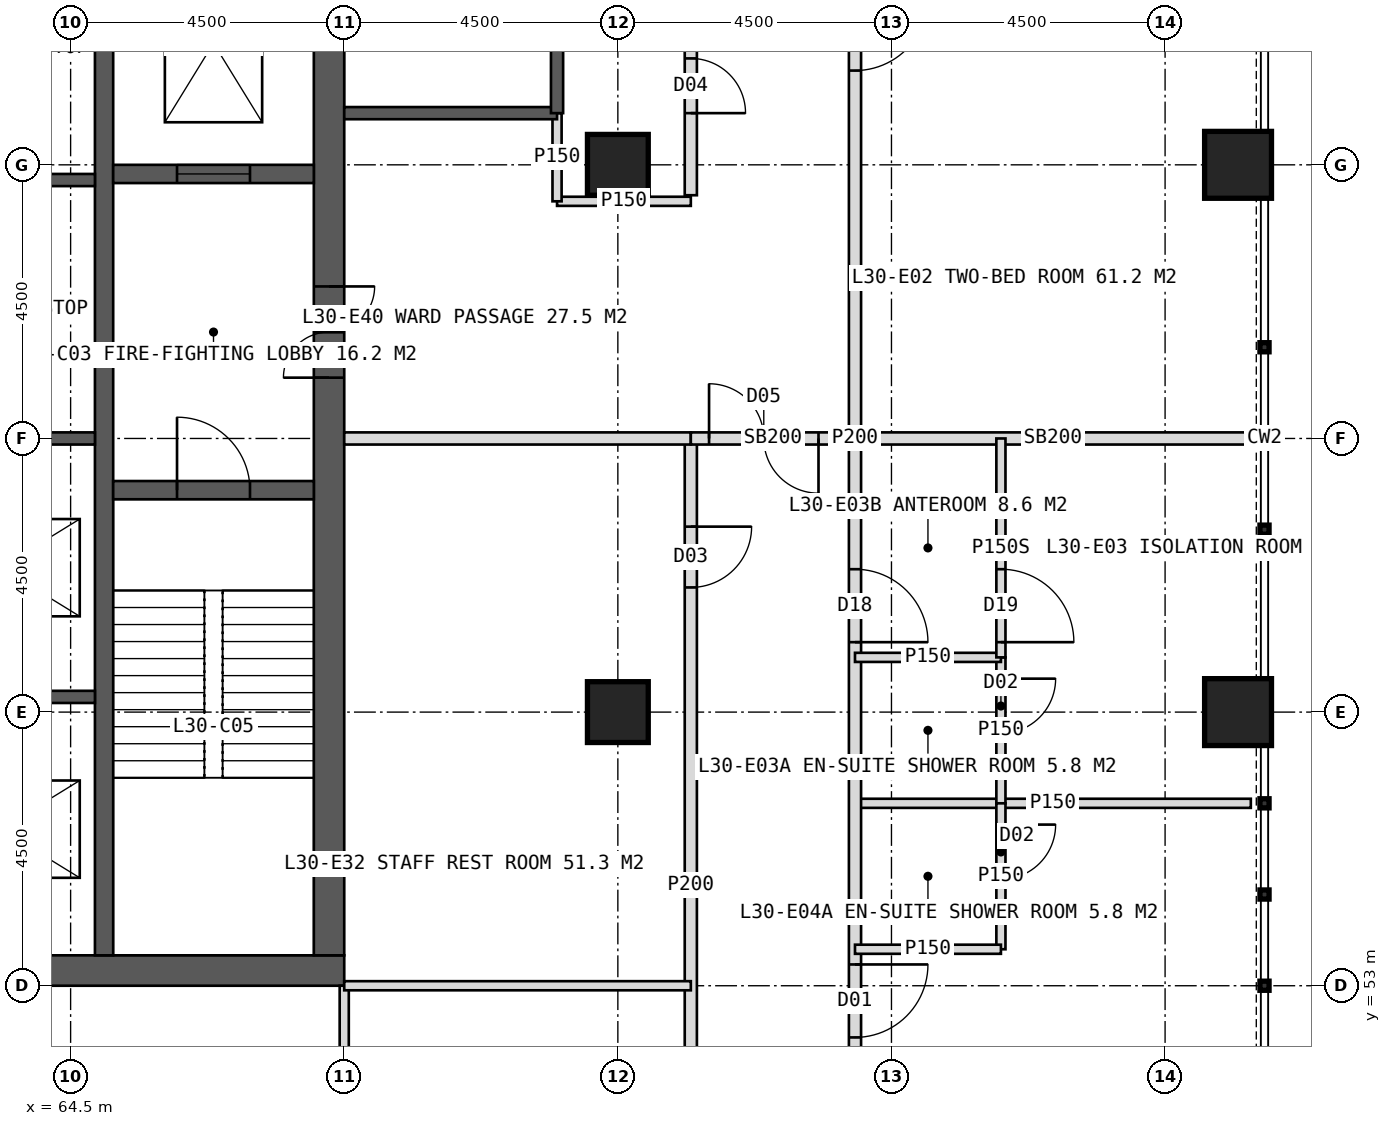
"""IFC4 building model, lengths in metres.
Left out: names, types, materials, properties, quantities, classifications, styles, units other than length and angle.
Written with IfcOpenShell. Run it as: python <this file> out.ifc"""

import sys

from ifc_helpers import new_model, si_unit, direction, frame, frame_2d, origin, origin_2d, place, context, subcontext, project, spatial, rectangle, hollow_rectangle, extrude, element, fill, save


model = new_model("IFC4")
c1 = context("Model", 3, precision=1e-05, world=origin(), true_north=direction((0.0, 1.0)))
c2 = subcontext(c1, "Body", "Model", "MODEL_VIEW")
j1 = project(units=[si_unit("LENGTHUNIT", "METRE"), si_unit("PLANEANGLEUNIT", "RADIAN")], contexts=[c1])
p1 = place(None, origin())
s1 = spatial("IfcSite", under=j1, at=p1, CompositionType="ELEMENT")
p2 = place(p1, origin())
s2 = spatial("IfcBuilding", under=s1, at=p2, CompositionType="ELEMENT")
p3 = place(p2, frame((0.0, 0.0, 128.0)))
s3 = spatial("IfcBuildingStorey", under=s2, at=p3, CompositionType="ELEMENT", Elevation=128.0)
p4 = place(p3, frame((51.0, 53.25, 0.0), z_axis=(0.0, 0.0, 1.0), x_axis=(1.0, 0.0, 0.0)))
e1 = element("IfcWall", 1, at=p4, inside=s3, PredefinedType="SHEAR", context=c2, shape_type="SweptSolid", body=[
    extrude(rectangle(XDim=18.0, YDim=0.5, at=frame_2d((9.0, 0.0))), origin(), (0.0, 0.0, 1.0), 4.0),
])
p5 = place(p4, frame((8.1, 0.0, 0.0)))
e2 = element("IfcOpeningElement", 2, at=p5, cuts=e1, PredefinedType="OPENING", context=c2, shape_type="SweptSolid", body=[
    extrude(rectangle(XDim=1.8, YDim=2.2, at=frame_2d((0.9, 1.1))), frame((0.0, 0.26, 0.0), z_axis=(0.0, -1.0, 0.0), x_axis=(1.0, 0.0, 0.0)), (0.0, 0.0, 1.0), 0.52),
])
p6 = place(p3, frame((68.75, 53.5, 0.0), z_axis=(0.0, 0.0, 1.0), x_axis=(0.0, 1.0, 0.0)))
e3 = element("IfcWall", 3, at=p6, inside=s3, PredefinedType="SHEAR", context=c2, shape_type="SweptSolid", body=[
    extrude(rectangle(XDim=17.0, YDim=0.5, at=frame_2d((8.5, 0.0))), origin(), (0.0, 0.0, 1.0), 4.0),
])
p7 = place(p6, frame((9.5, 0.0, 0.0)))
e4 = element("IfcOpeningElement", 4, at=p7, cuts=e3, PredefinedType="OPENING", context=c2, shape_type="SweptSolid", body=[
    extrude(rectangle(XDim=1.5, YDim=2.2, at=frame_2d((0.75, 1.1))), frame((0.0, 0.26, 0.0), z_axis=(0.0, -1.0, 0.0), x_axis=(1.0, 0.0, 0.0)), (0.0, 0.0, 1.0), 0.52),
])
p8 = place(p3, frame((65.05, 53.5, 0.0), z_axis=(0.0, 0.0, 1.0), x_axis=(0.0, 1.0, 0.0)))
e5 = element("IfcWall", 5, at=p8, inside=s3, PredefinedType="SHEAR", context=c2, shape_type="SweptSolid", body=[
    extrude(rectangle(XDim=17.0, YDim=0.3, at=frame_2d((8.5, 0.0))), origin(), (0.0, 0.0, 1.0), 4.0),
])
for number, where, z_axis, x_axis in (
    (6, (61.85, 57.75, 0.0), (0.0, 0.0, 1.0), (1.0, 0.0, 0.0)),
    (7, (61.85, 62.0, 0.0), (0.0, 0.0, 1.0), (1.0, 0.0, 0.0)),
    (8, (61.85, 66.25, 0.0), (0.0, 0.0, 1.0), (1.0, 0.0, 0.0)),
):
    element("IfcWall", number, at=place(p3, frame(where, z_axis=z_axis, x_axis=x_axis)), inside=s3, PredefinedType="SHEAR", context=c2, shape_type="SweptSolid", body=[
        extrude(rectangle(XDim=3.05, YDim=0.2, at=frame_2d((1.525, 0.0))), origin(), (0.0, 0.0, 1.0), 4.0),
    ])
p9 = place(p3, frame((65.2, 61.15, 0.0), z_axis=(0.0, 0.0, 1.0), x_axis=(1.0, 0.0, 0.0)))
e9 = element("IfcWall", 9, at=p9, inside=s3, PredefinedType="SHEAR", context=c2, shape_type="SweptSolid", body=[
    extrude(rectangle(XDim=3.3, YDim=0.3, at=frame_2d((1.65, 0.0))), origin(), (0.0, 0.0, 1.0), 4.0),
])
p10 = place(p9, frame((1.05, 0.0, 0.0)))
e10 = element("IfcOpeningElement", 10, at=p10, cuts=e9, PredefinedType="OPENING", context=c2, shape_type="SweptSolid", body=[
    extrude(rectangle(XDim=1.2, YDim=2.1, at=frame_2d((0.6, 1.05))), frame((0.0, 0.16, 0.0), z_axis=(0.0, -1.0, 0.0), x_axis=(1.0, 0.0, 0.0)), (0.0, 0.0, 1.0), 0.32),
])
p11 = place(p3, frame((65.2, 66.35, 0.0), z_axis=(0.0, 0.0, 1.0), x_axis=(1.0, 0.0, 0.0)))
e11 = element("IfcWall", 11, at=p11, inside=s3, PredefinedType="SHEAR", context=c2, shape_type="SweptSolid", body=[
    extrude(rectangle(XDim=3.3, YDim=0.3, at=frame_2d((1.65, 0.0))), origin(), (0.0, 0.0, 1.0), 4.0),
])
p12 = place(p11, frame((1.05, 0.0, 0.0)))
e12 = element("IfcOpeningElement", 12, at=p12, cuts=e11, PredefinedType="OPENING", context=c2, shape_type="SweptSolid", body=[
    extrude(rectangle(XDim=1.2, YDim=2.2, at=frame_2d((0.6, 1.1))), frame((0.0, 0.16, 0.0), z_axis=(0.0, -1.0, 0.0), x_axis=(1.0, 0.0, 0.0)), (0.0, 0.0, 1.0), 0.32),
])
for number, where, z_axis, x_axis in (
    (13, (73.5, 57.5, 0.0), (0.0, 0.0, 1.0), (1.0, 0.0, 0.0)),
    (14, (73.5, 66.5, 0.0), (0.0, 0.0, 1.0), (1.0, 0.0, 0.0)),
):
    element("IfcColumn", number, at=place(p3, frame(where, z_axis=z_axis, x_axis=x_axis)), inside=s3, PredefinedType="COLUMN", context=c2, shape_type="SweptSolid", body=[
        extrude(hollow_rectangle(XDim=1.0, YDim=1.0, WallThickness=0.1, at=origin_2d()), origin(), (0.0, 0.0, 1.0), 4.0),
    ])
for number, where, z_axis, x_axis in (
    (15, (83.7, 57.5, 0.0), (0.0, 0.0, 1.0), (1.0, 0.0, 0.0)),
    (16, (83.7, 66.5, 0.0), (0.0, 0.0, 1.0), (1.0, 0.0, 0.0)),
):
    element("IfcColumn", number, at=place(p3, frame(where, z_axis=z_axis, x_axis=x_axis)), inside=s3, PredefinedType="COLUMN", context=c2, shape_type="SweptSolid", body=[
        extrude(hollow_rectangle(XDim=1.1, YDim=1.1, WallThickness=0.1, at=origin_2d()), origin(), (0.0, 0.0, 1.0), 4.0),
    ])
p13 = place(p3, frame((69.0, 53.0, 0.0), z_axis=(0.0, 0.0, 1.0), x_axis=(0.0, -1.0, 0.0)))
e17 = element("IfcWall", 17, at=p13, inside=s3, PredefinedType="PARTITIONING", context=c2, shape_type="SweptSolid", body=[
    extrude(rectangle(XDim=5.7, YDim=0.15, at=frame_2d((2.85, 0.0))), origin(), (0.0, 0.0, 1.0), 3.75),
])
p14 = place(p3, frame((77.4, 62.0, 0.0), z_axis=(0.0, 0.0, 1.0), x_axis=(1.0, 0.0, 0.0)))
e18 = element("IfcWall", 18, at=p14, inside=s3, PredefinedType="SOLIDWALL", context=c2, shape_type="SweptSolid", body=[
    extrude(rectangle(XDim=6.51, YDim=0.2, at=frame_2d((3.255, 0.0))), origin(), (0.0, 0.0, 1.0), 2.95),
])
p15 = place(p3, frame((77.4, 56.0, 0.0), z_axis=(0.0, 0.0, 1.0), x_axis=(1.0, 0.0, 0.0)))
e19 = element("IfcWall", 19, at=p15, inside=s3, PredefinedType="PARTITIONING", context=c2, shape_type="SweptSolid", body=[
    extrude(rectangle(XDim=6.51, YDim=0.15, at=frame_2d((3.255, 0.0))), origin(), (0.0, 0.0, 1.0), 3.75),
])
p16 = place(p3, frame((77.4, 79.4, 0.0), z_axis=(0.0, 0.0, 1.0), x_axis=(0.0, -1.0, 0.0)))
e20 = element("IfcWall", 20, at=p16, inside=s3, PredefinedType="PARTITIONING", context=c2, shape_type="SweptSolid", body=[
    extrude(rectangle(XDim=34.8, YDim=0.2, at=frame_2d((17.4, 0.0))), origin(), (0.0, 0.0, 1.0), 3.75),
])
p17 = place(p16, frame((2.45, 0.0, 0.0)))
e21 = element("IfcOpeningElement", 21, at=p17, cuts=e20, PredefinedType="OPENING", context=c2, shape_type="SweptSolid", body=[
    extrude(rectangle(XDim=1.2, YDim=2.2, at=frame_2d((0.6, 1.1))), frame((0.0, 0.11, 0.0), z_axis=(0.0, -1.0, 0.0), x_axis=(1.0, 0.0, 0.0)), (0.0, 0.0, 1.0), 0.22),
])
p18 = place(p16, frame((10.15, 0.0, 0.0)))
e22 = element("IfcOpeningElement", 22, at=p18, cuts=e20, PredefinedType="OPENING", context=c2, shape_type="SweptSolid", body=[
    extrude(rectangle(XDim=1.2, YDim=2.2, at=frame_2d((0.6, 1.1))), frame((0.0, 0.11, 0.0), z_axis=(0.0, -1.0, 0.0), x_axis=(1.0, 0.0, 0.0)), (0.0, 0.0, 1.0), 0.22),
])
p19 = place(p16, frame((19.55, 0.0, 0.0)))
e23 = element("IfcOpeningElement", 23, at=p19, cuts=e20, PredefinedType="OPENING", context=c2, shape_type="SweptSolid", body=[
    extrude(rectangle(XDim=1.2, YDim=2.2, at=frame_2d((0.6, 1.1))), frame((0.0, 0.11, 0.0), z_axis=(0.0, -1.0, 0.0), x_axis=(1.0, 0.0, 0.0)), (0.0, 0.0, 1.0), 0.22),
])
p20 = place(p16, frame((26.05, 0.0, 0.0)))
e24 = element("IfcOpeningElement", 24, at=p20, cuts=e20, PredefinedType="OPENING", context=c2, shape_type="SweptSolid", body=[
    extrude(rectangle(XDim=1.2, YDim=2.2, at=frame_2d((0.6, 1.1))), frame((0.0, 0.11, 0.0), z_axis=(0.0, -1.0, 0.0), x_axis=(1.0, 0.0, 0.0)), (0.0, 0.0, 1.0), 0.22),
])
p21 = place(p3, frame((79.8, 58.4, 0.0), z_axis=(0.0, 0.0, 1.0), x_axis=(0.0, -1.0, 0.0)))
e25 = element("IfcWall", 25, at=p21, inside=s3, PredefinedType="PARTITIONING", context=c2, shape_type="SweptSolid", body=[
    extrude(rectangle(XDim=2.4, YDim=0.15, at=frame_2d((1.2, 0.0))), origin(), (0.0, 0.0, 1.0), 3.75),
])
p22 = place(p21, frame((0.35, 0.0, 0.0)))
e26 = element("IfcOpeningElement", 26, at=p22, cuts=e25, PredefinedType="OPENING", context=c2, shape_type="SweptSolid", body=[
    extrude(rectangle(XDim=0.9, YDim=2.1, at=frame_2d((0.45, 1.05))), frame((0.0, 0.085, 0.0), z_axis=(0.0, -1.0, 0.0), x_axis=(1.0, 0.0, 0.0)), (0.0, 0.0, 1.0), 0.17),
])
p23 = place(p3, frame((77.4, 58.4, 0.0), z_axis=(0.0, 0.0, 1.0), x_axis=(1.0, 0.0, 0.0)))
e27 = element("IfcWall", 27, at=p23, inside=s3, PredefinedType="PARTITIONING", context=c2, shape_type="SweptSolid", body=[
    extrude(rectangle(XDim=2.4, YDim=0.15, at=frame_2d((1.2, 0.0))), origin(), (0.0, 0.0, 1.0), 3.75),
])
p24 = place(p3, frame((79.8, 62.0, 0.0), z_axis=(0.0, 0.0, 1.0), x_axis=(0.0, -1.0, 0.0)))
e28 = element("IfcWall", 28, at=p24, inside=s3, PredefinedType="PARTITIONING", context=c2, shape_type="SweptSolid", body=[
    extrude(rectangle(XDim=3.6, YDim=0.15, at=frame_2d((1.8, 0.0))), origin(), (0.0, 0.0, 1.0), 3.75),
])
p25 = place(p24, frame((2.15, 0.0, 0.0)))
e29 = element("IfcOpeningElement", 29, at=p25, cuts=e28, PredefinedType="OPENING", context=c2, shape_type="SweptSolid", body=[
    extrude(rectangle(XDim=1.2, YDim=2.2, at=frame_2d((0.6, 1.1))), frame((0.0, 0.085, 0.0), z_axis=(0.0, -1.0, 0.0), x_axis=(1.0, 0.0, 0.0)), (0.0, 0.0, 1.0), 0.17),
])
p26 = place(p3, frame((79.8, 56.0, 0.0), z_axis=(0.0, 0.0, 1.0), x_axis=(0.0, -1.0, 0.0)))
e30 = element("IfcWall", 30, at=p26, inside=s3, PredefinedType="PARTITIONING", context=c2, shape_type="SweptSolid", body=[
    extrude(rectangle(XDim=2.4, YDim=0.15, at=frame_2d((1.2, 0.0))), origin(), (0.0, 0.0, 1.0), 3.75),
])
p27 = place(p26, frame((0.35, 0.0, 0.0)))
e31 = element("IfcOpeningElement", 31, at=p27, cuts=e30, PredefinedType="OPENING", context=c2, shape_type="SweptSolid", body=[
    extrude(rectangle(XDim=0.9, YDim=2.1, at=frame_2d((0.45, 1.05))), frame((0.0, 0.085, 0.0), z_axis=(0.0, -1.0, 0.0), x_axis=(1.0, 0.0, 0.0)), (0.0, 0.0, 1.0), 0.17),
])
p28 = place(p3, frame((77.4, 53.6, 0.0), z_axis=(0.0, 0.0, 1.0), x_axis=(1.0, 0.0, 0.0)))
e32 = element("IfcWall", 32, at=p28, inside=s3, PredefinedType="PARTITIONING", context=c2, shape_type="SweptSolid", body=[
    extrude(rectangle(XDim=2.4, YDim=0.15, at=frame_2d((1.2, 0.0))), origin(), (0.0, 0.0, 1.0), 3.75),
])
p29 = place(p3, frame((74.7, 76.7, 0.0), z_axis=(0.0, 0.0, 1.0), x_axis=(0.0, -1.0, 0.0)))
e33 = element("IfcWall", 33, at=p29, inside=s3, PredefinedType="PARTITIONING", context=c2, shape_type="SweptSolid", body=[
    extrude(rectangle(XDim=10.7, YDim=0.2, at=frame_2d((5.35, 0.0))), origin(), (0.0, 0.0, 1.0), 3.75),
])
p30 = place(p29, frame((1.6, 0.0, 0.0)))
e34 = element("IfcOpeningElement", 34, at=p30, cuts=e33, PredefinedType="OPENING", context=c2, shape_type="SweptSolid", body=[
    extrude(rectangle(XDim=1.0, YDim=2.1, at=frame_2d((0.5, 1.05))), frame((0.0, 0.11, 0.0), z_axis=(0.0, -1.0, 0.0), x_axis=(1.0, 0.0, 0.0)), (0.0, 0.0, 1.0), 0.22),
])
p31 = place(p29, frame((8.45, 0.0, 0.0)))
e35 = element("IfcOpeningElement", 35, at=p31, cuts=e33, PredefinedType="OPENING", context=c2, shape_type="SweptSolid", body=[
    extrude(rectangle(XDim=0.9, YDim=2.1, at=frame_2d((0.45, 1.05))), frame((0.0, 0.11, 0.0), z_axis=(0.0, -1.0, 0.0), x_axis=(1.0, 0.0, 0.0)), (0.0, 0.0, 1.0), 0.22),
])
p32 = place(p3, frame((74.7, 62.0, 0.0), z_axis=(0.0, 0.0, 1.0), x_axis=(0.0, -1.0, 0.0)))
e36 = element("IfcWall", 36, at=p32, inside=s3, PredefinedType="PARTITIONING", context=c2, shape_type="SweptSolid", body=[
    extrude(rectangle(XDim=14.7, YDim=0.2, at=frame_2d((7.35, 0.0))), origin(), (0.0, 0.0, 1.0), 3.75),
])
p33 = place(p32, frame((1.45, 0.0, 0.0)))
e37 = element("IfcOpeningElement", 37, at=p33, cuts=e36, PredefinedType="OPENING", context=c2, shape_type="SweptSolid", body=[
    extrude(rectangle(XDim=1.0, YDim=2.1, at=frame_2d((0.5, 1.05))), frame((0.0, 0.11, 0.0), z_axis=(0.0, -1.0, 0.0), x_axis=(1.0, 0.0, 0.0)), (0.0, 0.0, 1.0), 0.22),
])
p34 = place(p32, frame((11.35, 0.0, 0.0)))
e38 = element("IfcOpeningElement", 38, at=p34, cuts=e36, PredefinedType="OPENING", context=c2, shape_type="SweptSolid", body=[
    extrude(rectangle(XDim=1.0, YDim=2.1, at=frame_2d((0.5, 1.05))), frame((0.0, 0.11, 0.0), z_axis=(0.0, -1.0, 0.0), x_axis=(1.0, 0.0, 0.0)), (0.0, 0.0, 1.0), 0.22),
])
p35 = place(p3, frame((72.5, 65.9, 0.0), z_axis=(0.0, 0.0, 1.0), x_axis=(1.0, 0.0, 0.0)))
e39 = element("IfcWall", 39, at=p35, inside=s3, PredefinedType="PARTITIONING", context=c2, shape_type="SweptSolid", body=[
    extrude(rectangle(XDim=2.2, YDim=0.15, at=frame_2d((1.1, 0.0))), origin(), (0.0, 0.0, 1.0), 3.75),
])
p36 = place(p3, frame((69.0, 62.0, 0.0), z_axis=(0.0, 0.0, 1.0), x_axis=(1.0, 0.0, 0.0)))
e40 = element("IfcWall", 40, at=p36, inside=s3, PredefinedType="SOLIDWALL", context=c2, shape_type="SweptSolid", body=[
    extrude(rectangle(XDim=5.7, YDim=0.2, at=frame_2d((2.85, 0.0))), origin(), (0.0, 0.0, 1.0), 2.95),
])
p37 = place(p3, frame((69.0, 53.0, 0.0), z_axis=(0.0, 0.0, 1.0), x_axis=(1.0, 0.0, 0.0)))
e41 = element("IfcWall", 41, at=p37, inside=s3, PredefinedType="PARTITIONING", context=c2, shape_type="SweptSolid", body=[
    extrude(rectangle(XDim=5.7, YDim=0.15, at=frame_2d((2.85, 0.0))), origin(), (0.0, 0.0, 1.0), 3.75),
])
p38 = place(p3, frame((74.7, 62.0, 0.0), z_axis=(0.0, 0.0, 1.0), x_axis=(1.0, 0.0, 0.0)))
e42 = element("IfcWall", 42, at=p38, inside=s3, PredefinedType="SOLIDWALL", context=c2, shape_type="SweptSolid", body=[
    extrude(rectangle(XDim=2.7, YDim=0.2, at=frame_2d((1.35, 0.0))), origin(), (0.0, 0.0, 1.0), 2.95),
])
p39 = place(p38, frame((0.3, 0.0, 0.0)))
e43 = element("IfcOpeningElement", 43, at=p39, cuts=e42, PredefinedType="OPENING", context=c2, shape_type="SweptSolid", body=[
    extrude(rectangle(XDim=1.8, YDim=2.2, at=frame_2d((0.9, 1.1))), frame((0.0, 0.11, 0.0), z_axis=(0.0, -1.0, 0.0), x_axis=(1.0, 0.0, 0.0)), (0.0, 0.0, 1.0), 0.22),
])
p40 = place(p3, frame((72.5, 65.9, 0.0), z_axis=(0.0, 0.0, 1.0), x_axis=(0.0, 1.0, 0.0)))
e44 = element("IfcWall", 44, at=p40, inside=s3, PredefinedType="PARTITIONING", context=c2, shape_type="SweptSolid", body=[
    extrude(rectangle(XDim=1.45, YDim=0.15, at=frame_2d((0.725, 0.0))), origin(), (0.0, 0.0, 1.0), 3.75),
])
p41 = place(p3, frame((69.0, 67.35, 0.0), z_axis=(0.0, 0.0, 1.0), x_axis=(1.0, 0.0, 0.0)))
e45 = element("IfcWall", 45, at=p41, inside=s3, PredefinedType="SOLIDWALL", context=c2, shape_type="SweptSolid", body=[
    extrude(rectangle(XDim=3.5, YDim=0.2, at=frame_2d((1.75, 0.0))), origin(), (0.0, 0.0, 1.0), 3.75),
])
p42 = place(p3, frame((72.5, 67.35, 0.0), z_axis=(0.0, 0.0, 1.0), x_axis=(0.0, 1.0, 0.0)))
e46 = element("IfcWall", 46, at=p42, inside=s3, PredefinedType="SOLIDWALL", context=c2, shape_type="SweptSolid", body=[
    extrude(rectangle(XDim=7.75, YDim=0.2, at=frame_2d((3.875, 0.0))), origin(), (0.0, 0.0, 1.0), 3.75),
])
p43 = place(p18, origin())
e47 = element("IfcDoor", 47, at=p43, inside=s3, OperationType="SINGLE_SWING_LEFT", PredefinedType="DOOR", context=c2, shape_type="SweptSolid", body=[
    extrude(rectangle(XDim=1.2, YDim=2.2, at=frame_2d((0.6, 1.1))), frame((0.0, 0.025, 0.0), z_axis=(0.0, -1.0, 0.0), x_axis=(1.0, 0.0, 0.0)), (0.0, 0.0, 1.0), 0.05),
])
fill(e22, e47)
p44 = place(p25, origin())
e48 = element("IfcDoor", 48, at=p44, inside=s3, OperationType="SINGLE_SWING_RIGHT", PredefinedType="DOOR", context=c2, shape_type="SweptSolid", body=[
    extrude(rectangle(XDim=1.2, YDim=2.2, at=frame_2d((0.6, 1.1))), frame((0.0, 0.025, 0.0), z_axis=(0.0, -1.0, 0.0), x_axis=(1.0, 0.0, 0.0)), (0.0, 0.0, 1.0), 0.05),
])
fill(e29, e48)
p45 = place(p19, origin())
e49 = element("IfcDoor", 49, at=p45, inside=s3, OperationType="SINGLE_SWING_RIGHT", PredefinedType="DOOR", context=c2, shape_type="SweptSolid", body=[
    extrude(rectangle(XDim=1.2, YDim=2.2, at=frame_2d((0.6, 1.1))), frame((0.0, 0.025, 0.0), z_axis=(0.0, -1.0, 0.0), x_axis=(1.0, 0.0, 0.0)), (0.0, 0.0, 1.0), 0.05),
])
fill(e23, e49)
p46 = place(p22, origin())
e50 = element("IfcDoor", 50, at=p46, inside=s3, OperationType="SINGLE_SWING_LEFT", PredefinedType="DOOR", context=c2, shape_type="SweptSolid", body=[
    extrude(rectangle(XDim=0.9, YDim=2.1, at=frame_2d((0.45, 1.05))), frame((0.0, 0.025, 0.0), z_axis=(0.0, -1.0, 0.0), x_axis=(1.0, 0.0, 0.0)), (0.0, 0.0, 1.0), 0.05),
])
fill(e26, e50)
p47 = place(p20, origin())
e51 = element("IfcDoor", 51, at=p47, inside=s3, OperationType="SINGLE_SWING_LEFT", PredefinedType="DOOR", context=c2, shape_type="SweptSolid", body=[
    extrude(rectangle(XDim=1.2, YDim=2.2, at=frame_2d((0.6, 1.1))), frame((0.0, 0.025, 0.0), z_axis=(0.0, -1.0, 0.0), x_axis=(1.0, 0.0, 0.0)), (0.0, 0.0, 1.0), 0.05),
])
fill(e24, e51)
p48 = place(p27, origin())
e52 = element("IfcDoor", 52, at=p48, inside=s3, OperationType="SINGLE_SWING_LEFT", PredefinedType="DOOR", context=c2, shape_type="SweptSolid", body=[
    extrude(rectangle(XDim=0.9, YDim=2.1, at=frame_2d((0.45, 1.05))), frame((0.0, 0.025, 0.0), z_axis=(0.0, -1.0, 0.0), x_axis=(1.0, 0.0, 0.0)), (0.0, 0.0, 1.0), 0.05),
])
fill(e31, e52)
p49 = place(p31, origin())
e53 = element("IfcDoor", 53, at=p49, inside=s3, OperationType="SINGLE_SWING_RIGHT", PredefinedType="DOOR", context=c2, shape_type="SweptSolid", body=[
    extrude(rectangle(XDim=0.9, YDim=2.1, at=frame_2d((0.45, 1.05))), frame((0.0, 0.025, 0.0), z_axis=(0.0, -1.0, 0.0), x_axis=(1.0, 0.0, 0.0)), (0.0, 0.0, 1.0), 0.05),
])
fill(e35, e53)
p50 = place(p33, origin())
e54 = element("IfcDoor", 54, at=p50, inside=s3, OperationType="SINGLE_SWING_LEFT", PredefinedType="DOOR", context=c2, shape_type="SweptSolid", body=[
    extrude(rectangle(XDim=1.0, YDim=2.1, at=frame_2d((0.5, 1.05))), frame((0.0, 0.025, 0.0), z_axis=(0.0, -1.0, 0.0), x_axis=(1.0, 0.0, 0.0)), (0.0, 0.0, 1.0), 0.05),
])
fill(e37, e54)
p51 = place(p39, origin())
e55 = element("IfcDoor", 55, at=p51, inside=s3, OperationType="DOUBLE_DOOR_DOUBLE_SWING", PredefinedType="DOOR", context=c2, shape_type="SweptSolid", body=[
    extrude(rectangle(XDim=1.8, YDim=2.2, at=frame_2d((0.9, 1.1))), frame((0.0, 0.025, 0.0), z_axis=(0.0, -1.0, 0.0), x_axis=(1.0, 0.0, 0.0)), (0.0, 0.0, 1.0), 0.05),
])
fill(e43, e55)
p52 = place(p7, origin())
e56 = element("IfcDoor", 56, at=p52, inside=s3, OperationType="DOUBLE_DOOR_SINGLE_SWING", PredefinedType="DOOR", context=c2, shape_type="SweptSolid", body=[
    extrude(rectangle(XDim=1.5, YDim=2.2, at=frame_2d((0.75, 1.1))), frame((0.0, 0.025, 0.0), z_axis=(0.0, -1.0, 0.0), x_axis=(1.0, 0.0, 0.0)), (0.0, 0.0, 1.0), 0.05),
])
fill(e4, e56)
p53 = place(p10, origin())
e57 = element("IfcDoor", 57, at=p53, inside=s3, OperationType="SINGLE_SWING_LEFT", PredefinedType="DOOR", context=c2, shape_type="SweptSolid", body=[
    extrude(rectangle(XDim=1.2, YDim=2.1, at=frame_2d((0.6, 1.05))), frame((0.0, 0.025, 0.0), z_axis=(0.0, -1.0, 0.0), x_axis=(1.0, 0.0, 0.0)), (0.0, 0.0, 1.0), 0.05),
])
fill(e10, e57)
p54 = place(p12, origin())
e58 = element("IfcDoor", 58, at=p54, inside=s3, OperationType="SLIDING_TO_LEFT", PredefinedType="DOOR", context=c2, shape_type="SweptSolid", body=[
    extrude(rectangle(XDim=1.2, YDim=2.2, at=frame_2d((0.6, 1.1))), frame((0.0, 0.025, 0.0), z_axis=(0.0, -1.0, 0.0), x_axis=(1.0, 0.0, 0.0)), (0.0, 0.0, 1.0), 0.05),
])
fill(e12, e58)
save(model, sys.argv[1])
